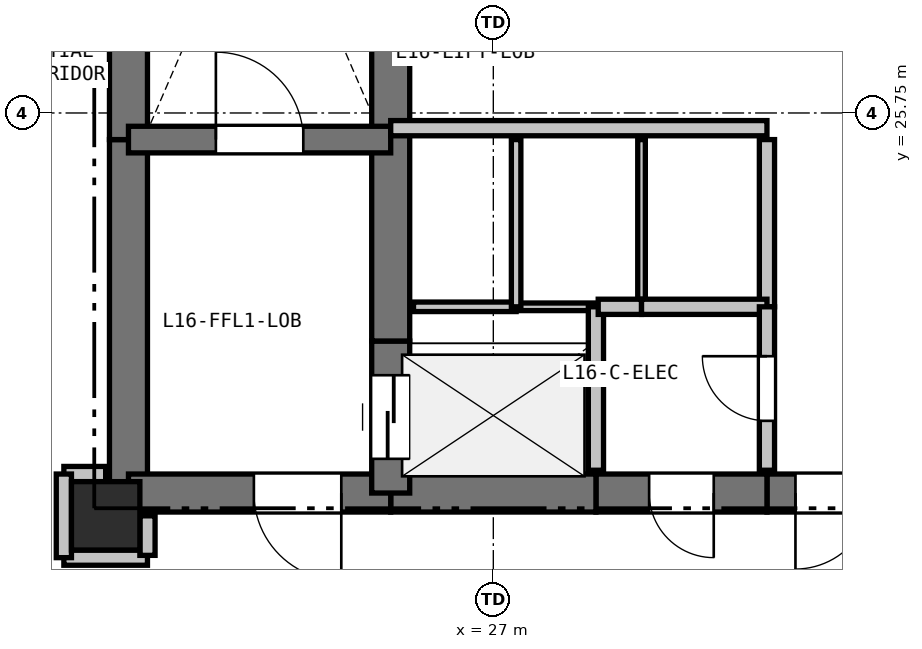
"""IFC4 building model, lengths in metres.
Left out: names, types, materials, properties, quantities, classifications, styles, units other than length and angle.
Written with IfcOpenShell. Run it as: python <this file> out.ifc"""

import sys

from ifc_helpers import new_model, si_unit, direction, frame, frame_2d, origin, origin_2d, place, context, subcontext, project, spatial, rectangle, extrude, element, fill, save


model = new_model("IFC4")
c1 = context("Model", 3, precision=1e-05, world=origin(), true_north=direction((0.0, 1.0)))
c2 = subcontext(c1, "Body", "Model", "MODEL_VIEW")
j1 = project(units=[si_unit("LENGTHUNIT", "METRE"), si_unit("PLANEANGLEUNIT", "RADIAN")], contexts=[c1])
p1 = place(None, origin())
s1 = spatial("IfcSite", under=j1, at=p1, CompositionType="ELEMENT")
p2 = place(p1, origin())
s2 = spatial("IfcBuilding", under=s1, at=p2, CompositionType="ELEMENT")
p3 = place(p2, frame((0.0, 0.0, 58.8)))
s3 = spatial("IfcBuildingStorey", under=s2, at=p3, CompositionType="ELEMENT", Elevation=58.8)
p4 = place(p3, frame((21.9, 20.45, 0.0), z_axis=(0.0, 0.0, 1.0), x_axis=(1.0, 0.0, 0.0)))
e1 = element("IfcColumn", 1, at=p4, inside=s3, PredefinedType="COLUMN", context=c2, shape_type="SweptSolid", body=[
    extrude(rectangle(XDim=0.9, YDim=0.9, at=origin_2d()), origin(), (0.0, 0.0, 1.0), 3.3),
])
p5 = place(p3, frame((22.2, 20.75, 0.0), z_axis=(0.0, 0.0, 1.0), x_axis=(0.0, 1.0, 0.0)))
e2 = element("IfcWall", 2, at=p5, inside=s3, PredefinedType="SHEAR", context=c2, shape_type="SweptSolid", body=[
    extrude(rectangle(XDim=4.65, YDim=0.5, at=frame_2d((2.325, 0.0))), origin(), (0.0, 0.0, 1.0), 3.02),
])
p6 = place(p3, frame((22.2, 25.4, 0.0), z_axis=(0.0, 0.0, 1.0), x_axis=(0.0, 1.0, 0.0)))
e3 = element("IfcWall", 3, at=p6, inside=s3, PredefinedType="SHEAR", context=c2, shape_type="SweptSolid", body=[
    extrude(rectangle(XDim=7.35, YDim=0.5, at=frame_2d((3.675, 0.0))), origin(), (0.0, 0.0, 1.0), 3.02),
])
p7 = place(p3, frame((32.35, 20.75, 0.0), z_axis=(0.0, 0.0, 1.0), x_axis=(-1.0, 0.0, 0.0)))
e4 = element("IfcWall", 4, at=p7, inside=s3, PredefinedType="SHEAR", context=c2, shape_type="SweptSolid", body=[
    extrude(rectangle(XDim=1.75, YDim=0.5, at=frame_2d((0.875, 0.0))), origin(), (0.0, 0.0, 1.0), 3.02),
])
p8 = place(p7, frame((0.375, 0.0, 0.0)))
e5 = element("IfcOpeningElement", 5, at=p8, cuts=e4, PredefinedType="OPENING", context=c2, shape_type="SweptSolid", body=[
    extrude(rectangle(XDim=1.0, YDim=2.15, at=frame_2d((0.5, 1.075))), frame((0.0, 0.26, 0.0), z_axis=(0.0, -1.0, 0.0), x_axis=(1.0, 0.0, 0.0)), (0.0, 0.0, 1.0), 0.52),
])
p9 = place(p3, frame((30.6, 20.75, 0.0), z_axis=(0.0, 0.0, 1.0), x_axis=(-1.0, 0.0, 0.0)))
e6 = element("IfcWall", 6, at=p9, inside=s3, PredefinedType="SHEAR", context=c2, shape_type="SweptSolid", body=[
    extrude(rectangle(XDim=2.25, YDim=0.5, at=frame_2d((1.125, 0.0))), origin(), (0.0, 0.0, 1.0), 3.02),
])
p10 = place(p9, frame((0.7, 0.0, 0.0)))
e7 = element("IfcOpeningElement", 7, at=p10, cuts=e6, PredefinedType="OPENING", context=c2, shape_type="SweptSolid", body=[
    extrude(rectangle(XDim=0.85, YDim=2.1, at=frame_2d((0.425, 1.05))), frame((0.0, 0.26, 0.0), z_axis=(0.0, -1.0, 0.0), x_axis=(1.0, 0.0, 0.0)), (0.0, 0.0, 1.0), 0.52),
])
p11 = place(p3, frame((28.35, 20.75, 0.0), z_axis=(0.0, 0.0, 1.0), x_axis=(-1.0, 0.0, 0.0)))
e8 = element("IfcWall", 8, at=p11, inside=s3, PredefinedType="SHEAR", context=c2, shape_type="SweptSolid", body=[
    extrude(rectangle(XDim=2.7, YDim=0.5, at=frame_2d((1.35, 0.0))), origin(), (0.0, 0.0, 1.0), 3.02),
])
p12 = place(p3, frame((25.65, 20.75, 0.0), z_axis=(0.0, 0.0, 1.0), x_axis=(-1.0, 0.0, 0.0)))
e9 = element("IfcWall", 9, at=p12, inside=s3, PredefinedType="SHEAR", context=c2, shape_type="SweptSolid", body=[
    extrude(rectangle(XDim=3.45, YDim=0.5, at=frame_2d((1.725, 0.0))), origin(), (0.0, 0.0, 1.0), 3.02),
])
p13 = place(p12, frame((0.65, 0.0, 0.0)))
e10 = element("IfcOpeningElement", 10, at=p13, cuts=e9, PredefinedType="OPENING", context=c2, shape_type="SweptSolid", body=[
    extrude(rectangle(XDim=1.15, YDim=2.15, at=frame_2d((0.575, 1.075))), frame((0.0, 0.26, 0.0), z_axis=(0.0, -1.0, 0.0), x_axis=(1.0, 0.0, 0.0)), (0.0, 0.0, 1.0), 0.52),
])
p14 = place(p3, frame((25.65, 20.75, 0.0), z_axis=(0.0, 0.0, 1.0), x_axis=(0.0, 1.0, 0.0)))
e11 = element("IfcWall", 11, at=p14, inside=s3, PredefinedType="SHEAR", context=c2, shape_type="SweptSolid", body=[
    extrude(rectangle(XDim=2.0, YDim=0.5, at=frame_2d((1.0, 0.0))), origin(), (0.0, 0.0, 1.0), 3.02),
])
p15 = place(p14, frame((0.45, 0.0, 0.0)))
e12 = element("IfcOpeningElement", 12, at=p15, cuts=e11, PredefinedType="OPENING", context=c2, shape_type="SweptSolid", body=[
    extrude(rectangle(XDim=1.1, YDim=2.15, at=frame_2d((0.55, 1.075))), frame((0.0, 0.26, 0.0), z_axis=(0.0, -1.0, 0.0), x_axis=(1.0, 0.0, 0.0)), (0.0, 0.0, 1.0), 0.52),
])
p16 = place(p3, frame((25.65, 22.75, 0.0), z_axis=(0.0, 0.0, 1.0), x_axis=(0.0, 1.0, 0.0)))
e13 = element("IfcWall", 13, at=p16, inside=s3, PredefinedType="SHEAR", context=c2, shape_type="SweptSolid", body=[
    extrude(rectangle(XDim=2.8, YDim=0.5, at=frame_2d((1.4, 0.0))), origin(), (0.0, 0.0, 1.0), 3.02),
])
p17 = place(p3, frame((25.65, 25.55, 0.0), z_axis=(0.0, 0.0, 1.0), x_axis=(0.0, 1.0, 0.0)))
e14 = element("IfcWall", 14, at=p17, inside=s3, PredefinedType="SHEAR", context=c2, shape_type="SweptSolid", body=[
    extrude(rectangle(XDim=2.4, YDim=0.5, at=frame_2d((1.2, 0.0))), origin(), (0.0, 0.0, 1.0), 3.02),
])
p18 = place(p3, frame((22.2, 25.4, 0.0), z_axis=(0.0, 0.0, 1.0), x_axis=(1.0, 0.0, 0.0)))
e15 = element("IfcWall", 15, at=p18, inside=s3, PredefinedType="SHEAR", context=c2, shape_type="SweptSolid", body=[
    extrude(rectangle(XDim=3.45, YDim=0.35, at=frame_2d((1.725, 0.0))), origin(), (0.0, 0.0, 1.0), 3.02),
])
p19 = place(p18, frame((1.15, 0.0, 0.0)))
e16 = element("IfcOpeningElement", 16, at=p19, cuts=e15, PredefinedType="OPENING", context=c2, shape_type="SweptSolid", body=[
    extrude(rectangle(XDim=1.15, YDim=2.15, at=frame_2d((0.575, 1.075))), frame((0.0, 0.185, 0.0), z_axis=(0.0, -1.0, 0.0), x_axis=(1.0, 0.0, 0.0)), (0.0, 0.0, 1.0), 0.37),
])
p20 = place(p3, frame((25.65, 25.55, 0.0), z_axis=(0.0, 0.0, 1.0), x_axis=(1.0, 0.0, 0.0)))
e17 = element("IfcWall", 17, at=p20, inside=s3, PredefinedType="PARTITIONING", context=c2, shape_type="SweptSolid", body=[
    extrude(rectangle(XDim=4.95, YDim=0.2, at=frame_2d((2.475, 0.0))), origin(), (0.0, 0.0, 1.0), 3.02),
])
p21 = place(p3, frame((25.95, 23.2, 0.0), z_axis=(0.0, 0.0, 1.0), x_axis=(1.0, 0.0, 0.0)))
e18 = element("IfcWall", 18, at=p21, inside=s3, PredefinedType="PARTITIONING", context=c2, shape_type="SweptSolid", body=[
    extrude(rectangle(XDim=1.35, YDim=0.125, at=frame_2d((0.675, 0.0))), origin(), (0.0, 0.0, 1.0), 3.02),
])
p22 = place(p3, frame((27.3, 23.2, 0.0), z_axis=(0.0, 0.0, 1.0), x_axis=(1.0, 0.0, 0.0)))
e19 = element("IfcWall", 19, at=p22, inside=s3, PredefinedType="PARTITIONING", context=c2, shape_type="SweptSolid", body=[
    extrude(rectangle(XDim=1.05, YDim=0.1, at=frame_2d((0.525, 0.0))), origin(), (0.0, 0.0, 1.0), 3.02),
])
p23 = place(p3, frame((28.35, 23.2, 0.0), z_axis=(0.0, 0.0, 1.0), x_axis=(0.0, -1.0, 0.0)))
e20 = element("IfcWall", 20, at=p23, inside=s3, PredefinedType="PARTITIONING", context=c2, shape_type="SweptSolid", body=[
    extrude(rectangle(XDim=2.15, YDim=0.2, at=frame_2d((1.075, 0.0))), origin(), (0.0, 0.0, 1.0), 3.02),
])
p24 = place(p3, frame((27.3, 25.4, 0.0), z_axis=(0.0, 0.0, 1.0), x_axis=(0.0, -1.0, 0.0)))
e21 = element("IfcWall", 21, at=p24, inside=s3, PredefinedType="PARTITIONING", context=c2, shape_type="SweptSolid", body=[
    extrude(rectangle(XDim=2.2, YDim=0.125, at=frame_2d((1.1, 0.0))), origin(), (0.0, 0.0, 1.0), 3.02),
])
p25 = place(p3, frame((28.95, 25.4, 0.0), z_axis=(0.0, 0.0, 1.0), x_axis=(0.0, -1.0, 0.0)))
e22 = element("IfcWall", 22, at=p25, inside=s3, PredefinedType="PARTITIONING", context=c2, shape_type="SweptSolid", body=[
    extrude(rectangle(XDim=2.2, YDim=0.1, at=frame_2d((1.1, 0.0))), origin(), (0.0, 0.0, 1.0), 3.02),
])
p26 = place(p3, frame((28.95, 23.2, 0.0), z_axis=(0.0, 0.0, 1.0), x_axis=(-1.0, 0.0, 0.0)))
e23 = element("IfcWall", 23, at=p26, inside=s3, PredefinedType="PARTITIONING", context=c2, shape_type="SweptSolid", body=[
    extrude(rectangle(XDim=0.57, YDim=0.2, at=frame_2d((0.285, 0.0))), origin(), (0.0, 0.0, 1.0), 3.02),
])
p27 = place(p3, frame((30.6, 25.4, 0.0), z_axis=(0.0, 0.0, 1.0), x_axis=(0.0, -1.0, 0.0)))
e24 = element("IfcWall", 24, at=p27, inside=s3, PredefinedType="PARTITIONING", context=c2, shape_type="SweptSolid", body=[
    extrude(rectangle(XDim=2.2, YDim=0.2, at=frame_2d((1.1, 0.0))), origin(), (0.0, 0.0, 1.0), 3.02),
])
p28 = place(p3, frame((30.6, 23.2, 0.0), z_axis=(0.0, 0.0, 1.0), x_axis=(-1.0, 0.0, 0.0)))
e25 = element("IfcWall", 25, at=p28, inside=s3, PredefinedType="PARTITIONING", context=c2, shape_type="SweptSolid", body=[
    extrude(rectangle(XDim=1.65, YDim=0.2, at=frame_2d((0.825, 0.0))), origin(), (0.0, 0.0, 1.0), 3.02),
])
p29 = place(p3, frame((30.6, 21.05, 0.0), z_axis=(0.0, 0.0, 1.0), x_axis=(0.0, 1.0, 0.0)))
e26 = element("IfcWall", 26, at=p29, inside=s3, PredefinedType="PARTITIONING", context=c2, shape_type="SweptSolid", body=[
    extrude(rectangle(XDim=2.15, YDim=0.2, at=frame_2d((1.075, 0.0))), origin(), (0.0, 0.0, 1.0), 3.02),
])
p30 = place(p29, frame((0.65, 0.0, 0.0)))
e27 = element("IfcOpeningElement", 27, at=p30, cuts=e26, PredefinedType="OPENING", context=c2, shape_type="SweptSolid", body=[
    extrude(rectangle(XDim=0.85, YDim=2.1, at=frame_2d((0.425, 1.05))), frame((0.0, 0.11, 0.0), z_axis=(0.0, -1.0, 0.0), x_axis=(1.0, 0.0, 0.0)), (0.0, 0.0, 1.0), 0.22),
])
p31 = place(p3, frame((21.35, 19.9, 0.0), z_axis=(0.0, 0.0, 1.0), x_axis=(1.0, 0.0, 0.0)))
e28 = element("IfcWall", 28, at=p31, inside=s3, PredefinedType="PARTITIONING", context=c2, shape_type="SweptSolid", body=[
    extrude(rectangle(XDim=1.1, YDim=0.2, at=frame_2d((0.55, 0.0))), origin(), (0.0, 0.0, 1.0), 2.317),
])
p32 = place(p3, frame((22.45, 19.93, 0.0), z_axis=(0.0, 0.0, 1.0), x_axis=(0.0, 1.0, 0.0)))
e29 = element("IfcWall", 29, at=p32, inside=s3, PredefinedType="PARTITIONING", context=c2, shape_type="SweptSolid", body=[
    extrude(rectangle(XDim=0.52, YDim=0.2, at=frame_2d((0.26, 0.0))), origin(), (0.0, 0.0, 1.0), 2.317),
])
p33 = place(p3, frame((21.9, 21.0, 0.0), z_axis=(0.0, 0.0, 1.0), x_axis=(-1.0, 0.0, 0.0)))
e30 = element("IfcWall", 30, at=p33, inside=s3, PredefinedType="PARTITIONING", context=c2, shape_type="SweptSolid", body=[
    extrude(rectangle(XDim=0.55, YDim=0.2, at=frame_2d((0.275, 0.0))), origin(), (0.0, 0.0, 1.0), 2.468),
])
p34 = place(p3, frame((21.35, 21.0, 0.0), z_axis=(0.0, 0.0, 1.0), x_axis=(0.0, -1.0, 0.0)))
e31 = element("IfcWall", 31, at=p34, inside=s3, PredefinedType="PARTITIONING", context=c2, shape_type="SweptSolid", body=[
    extrude(rectangle(XDim=1.1, YDim=0.2, at=frame_2d((0.55, 0.0))), origin(), (0.0, 0.0, 1.0), 2.317),
])
p35 = place(p8, origin())
e32 = element("IfcDoor", 32, at=p35, inside=s3, OperationType="SINGLE_SWING_RIGHT", PredefinedType="DOOR", context=c2, shape_type="SweptSolid", body=[
    extrude(rectangle(XDim=1.0, YDim=2.15, at=frame_2d((0.5, 1.075))), frame((0.0, 0.025, 0.0), z_axis=(0.0, -1.0, 0.0), x_axis=(1.0, 0.0, 0.0)), (0.0, 0.0, 1.0), 0.05),
])
fill(e5, e32)
p36 = place(p15, origin())
e33 = element("IfcDoor", 33, at=p36, inside=s3, OperationType="SLIDING_TO_LEFT", PredefinedType="DOOR", context=c2, shape_type="SweptSolid", body=[
    extrude(rectangle(XDim=1.1, YDim=2.15, at=frame_2d((0.55, 1.075))), frame((0.0, 0.025, 0.0), z_axis=(0.0, -1.0, 0.0), x_axis=(1.0, 0.0, 0.0)), (0.0, 0.0, 1.0), 0.05),
])
fill(e12, e33)
p37 = place(p19, origin())
e34 = element("IfcDoor", 34, at=p37, inside=s3, OperationType="SINGLE_SWING_LEFT", PredefinedType="DOOR", context=c2, shape_type="SweptSolid", body=[
    extrude(rectangle(XDim=1.15, YDim=2.15, at=frame_2d((0.575, 1.075))), frame((0.0, 0.025, 0.0), z_axis=(0.0, -1.0, 0.0), x_axis=(1.0, 0.0, 0.0)), (0.0, 0.0, 1.0), 0.05),
])
fill(e16, e34)
p38 = place(p13, origin())
e35 = element("IfcDoor", 35, at=p38, inside=s3, OperationType="SINGLE_SWING_LEFT", PredefinedType="DOOR", context=c2, shape_type="SweptSolid", body=[
    extrude(rectangle(XDim=1.15, YDim=2.15, at=frame_2d((0.575, 1.075))), frame((0.0, 0.025, 0.0), z_axis=(0.0, -1.0, 0.0), x_axis=(1.0, 0.0, 0.0)), (0.0, 0.0, 1.0), 0.05),
])
fill(e10, e35)
p39 = place(p30, origin())
e36 = element("IfcDoor", 36, at=p39, inside=s3, OperationType="SINGLE_SWING_RIGHT", PredefinedType="DOOR", context=c2, shape_type="SweptSolid", body=[
    extrude(rectangle(XDim=0.85, YDim=2.1, at=frame_2d((0.425, 1.05))), frame((0.0, 0.025, 0.0), z_axis=(0.0, -1.0, 0.0), x_axis=(1.0, 0.0, 0.0)), (0.0, 0.0, 1.0), 0.05),
])
fill(e27, e36)
p40 = place(p10, origin())
e37 = element("IfcDoor", 37, at=p40, inside=s3, OperationType="SINGLE_SWING_LEFT", PredefinedType="DOOR", context=c2, shape_type="SweptSolid", body=[
    extrude(rectangle(XDim=0.85, YDim=2.1, at=frame_2d((0.425, 1.05))), frame((0.0, 0.025, 0.0), z_axis=(0.0, -1.0, 0.0), x_axis=(1.0, 0.0, 0.0)), (0.0, 0.0, 1.0), 0.05),
])
fill(e7, e37)
save(model, sys.argv[1])
